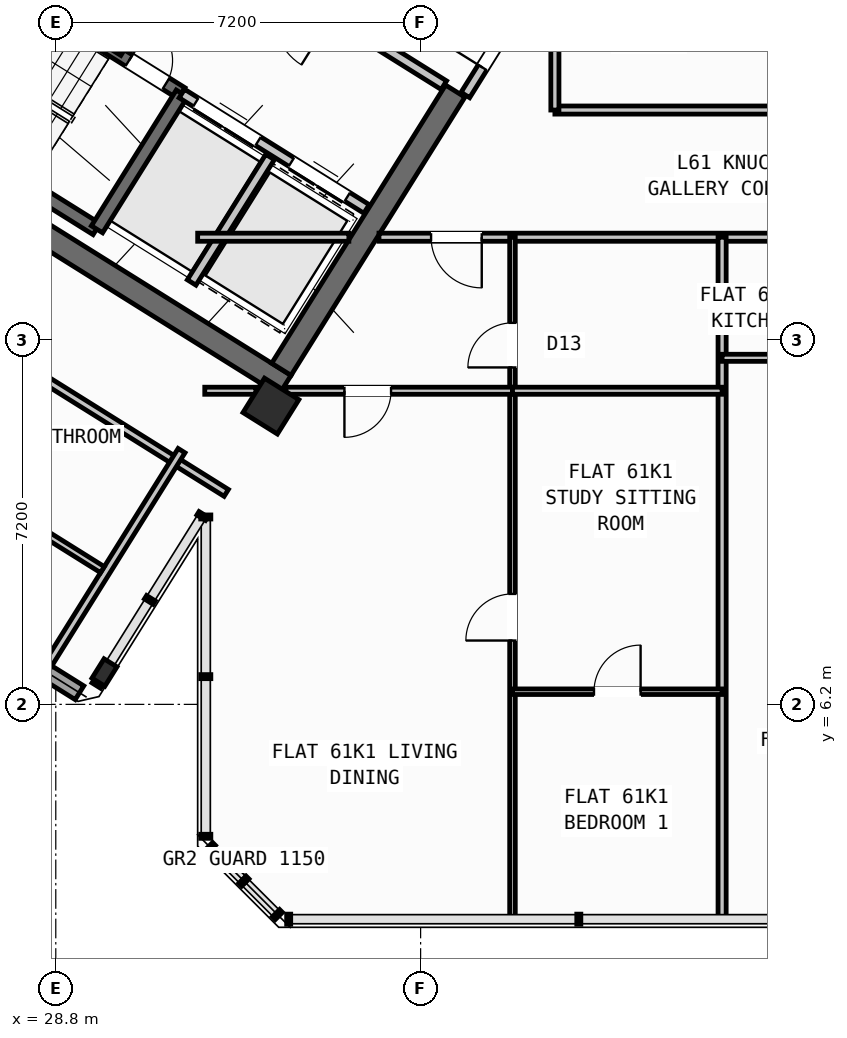
"""IFC4 building model, lengths in metres.
Left out: names, types, materials, properties, quantities, classifications, styles, units other than length and angle.
Written with IfcOpenShell. Run it as: python <this file> out.ifc"""

import sys

from ifc_helpers import new_model, si_unit, direction, frame, frame_2d, origin, origin_2d, place, context, subcontext, project, spatial, rectangle, hollow_rectangle, i_section, extrude, source, transform, mapped, element, fill, save


model = new_model("IFC4")
c1 = context("Model", 3, precision=1e-05, world=origin(), true_north=direction((0.0, 1.0)))
c2 = subcontext(c1, "Body", "Model", "MODEL_VIEW")
j1 = project(units=[si_unit("LENGTHUNIT", "METRE"), si_unit("PLANEANGLEUNIT", "RADIAN")], contexts=[c1])
p1 = place(None, origin())
s1 = spatial("IfcSite", under=j1, at=p1, CompositionType="ELEMENT")
p2 = place(p1, origin())
s2 = spatial("IfcBuilding", under=s1, at=p2, CompositionType="ELEMENT")
p3 = place(p2, frame((0.0, 0.0, 242.1)))
s3 = spatial("IfcBuildingStorey", under=s2, at=p3, CompositionType="ELEMENT", Elevation=242.1)
p4 = place(p3, frame((33.324, 12.503, 0.0), z_axis=(0.0, 0.0, 1.0), x_axis=(-0.848043529849, 0.529926571782, 0.0)))
e1 = element("IfcWall", 1, at=p4, inside=s3, PredefinedType="SHEAR", context=c2, shape_type="SweptSolid", body=[
    extrude(rectangle(XDim=13.04, YDim=0.45, at=frame_2d((6.52, 0.0))), origin(), (0.0, 0.0, 1.0), 3.32),
])
p5 = place(p3, frame((36.683, 18.304, 0.0), z_axis=(0.0, 0.0, 1.0), x_axis=(-0.529904039071, -0.848057609704, 0.0)))
e2 = element("IfcWall", 2, at=p5, inside=s3, PredefinedType="SHEAR", context=c2, shape_type="SweptSolid", body=[
    extrude(rectangle(XDim=6.475, YDim=0.45, at=frame_2d((3.238, 0.0))), origin(), (0.0, 0.0, 1.0), 3.32),
])
m1 = source(origin(), c2, "Body", "SweptSolid", [
    extrude(hollow_rectangle(XDim=0.8, YDim=0.8, WallThickness=0.032, at=origin_2d()), origin(), (0.0, 0.0, 1.0), 3.6),
])
p6 = place(p3, frame((33.046, 12.087, 0.0), z_axis=(0.0, 0.0, 1.0), x_axis=(-0.848048096156, 0.529919264233, 0.0)))
e3 = element("IfcColumn", 3, at=p6, inside=s3, PredefinedType="COLUMN", context=c2, shape_type="MappedRepresentation", body=[
    mapped(m1, transform((0.0, 0.0, 0.0), scale=1.0)),
])
m2 = source(origin(), c2, "Body", "SweptSolid", [
    extrude(i_section(OverallWidth=0.3, OverallDepth=0.45, WebThickness=0.014, FlangeThickness=0.026, at=origin_2d()), origin(), (0.0, 0.0, 1.0), 3.6),
])
p7 = place(p3, frame((29.761, 6.829, 0.0), z_axis=(0.0, 0.0, 1.0), x_axis=(-0.848048096156, 0.529919264233, 0.0)))
e4 = element("IfcColumn", 4, at=p7, inside=s3, PredefinedType="COLUMN", context=c2, shape_type="MappedRepresentation", body=[
    mapped(m2, transform((0.0, 0.0, 0.0), scale=1.0)),
])
p8 = place(p3, frame((29.268, 6.429, 0.0), z_axis=(0.0, 0.0, 1.0), x_axis=(-0.848049971435, 0.529916263149, 0.0)))
e5 = element("IfcWall", 5, at=p8, inside=s3, PredefinedType="STANDARD", context=c2, shape_type="SweptSolid", body=[
    extrude(rectangle(XDim=31.588, YDim=0.32, at=frame_2d((15.794, 0.0))), origin(), (0.0, 0.0, 1.0), 3.32),
])
p9 = place(p8, frame((16.235, 0.0, 0.0)))
e6 = element("IfcOpeningElement", 6, at=p9, cuts=e5, PredefinedType="OPENING", context=c2, shape_type="SweptSolid", body=[
    extrude(rectangle(XDim=1.2, YDim=2.15, at=frame_2d((0.6, 1.075))), frame((0.0, 0.17, 0.0), z_axis=(0.0, -1.0, 0.0), x_axis=(1.0, 0.0, 0.0)), (0.0, 0.0, 1.0), 0.34),
])
p10 = place(p8, frame((3.859, 0.0, 0.9)))
e7 = element("IfcOpeningElement", 7, at=p10, cuts=e5, PredefinedType="OPENING", context=c2, shape_type="SweptSolid", body=[
    extrude(rectangle(XDim=1.65, YDim=1.45, at=frame_2d((0.825, 0.725))), frame((0.0, 0.17, 0.0), z_axis=(0.0, -1.0, 0.0), x_axis=(1.0, 0.0, 0.0)), (0.0, 0.0, 1.0), 0.34),
])
p11 = place(p8, frame((10.519, 0.0, 0.9)))
e8 = element("IfcOpeningElement", 8, at=p11, cuts=e5, PredefinedType="OPENING", context=c2, shape_type="SweptSolid", body=[
    extrude(rectangle(XDim=1.65, YDim=1.45, at=frame_2d((0.825, 0.725))), frame((0.0, 0.17, 0.0), z_axis=(0.0, -1.0, 0.0), x_axis=(1.0, 0.0, 0.0)), (0.0, 0.0, 1.0), 0.34),
])
p12 = place(p8, frame((19.182, 0.0, 1.0)))
e9 = element("IfcOpeningElement", 9, at=p12, cuts=e5, PredefinedType="OPENING", context=c2, shape_type="SweptSolid", body=[
    extrude(rectangle(XDim=0.9, YDim=1.25, at=frame_2d((0.45, 0.625))), frame((0.0, 0.17, 0.0), z_axis=(0.0, -1.0, 0.0), x_axis=(1.0, 0.0, 0.0)), (0.0, 0.0, 1.0), 0.34),
])
p13 = place(p8, frame((22.524, 0.0, 1.0)))
e10 = element("IfcOpeningElement", 10, at=p13, cuts=e5, PredefinedType="OPENING", context=c2, shape_type="SweptSolid", body=[
    extrude(rectangle(XDim=0.9, YDim=1.25, at=frame_2d((0.45, 0.625))), frame((0.0, 0.17, 0.0), z_axis=(0.0, -1.0, 0.0), x_axis=(1.0, 0.0, 0.0)), (0.0, 0.0, 1.0), 0.34),
])
p14 = place(p8, frame((25.658, 0.0, 0.9)))
e11 = element("IfcOpeningElement", 11, at=p14, cuts=e5, PredefinedType="OPENING", context=c2, shape_type="SweptSolid", body=[
    extrude(rectangle(XDim=1.65, YDim=1.45, at=frame_2d((0.825, 0.725))), frame((0.0, 0.17, 0.0), z_axis=(0.0, -1.0, 0.0), x_axis=(1.0, 0.0, 0.0)), (0.0, 0.0, 1.0), 0.34),
])
p15 = place(p8, frame((29.278, 0.0, 0.9)))
e12 = element("IfcOpeningElement", 12, at=p15, cuts=e5, PredefinedType="OPENING", context=c2, shape_type="SweptSolid", body=[
    extrude(rectangle(XDim=1.35, YDim=1.45, at=frame_2d((0.675, 0.725))), frame((0.0, 0.17, 0.0), z_axis=(0.0, -1.0, 0.0), x_axis=(1.0, 0.0, 0.0)), (0.0, 0.0, 1.0), 0.34),
])
p16 = place(p3, frame((29.605, 15.581, 0.0), z_axis=(0.0, 0.0, 1.0), x_axis=(-0.848036911448, 0.529937163087, 0.0)))
e13 = element("IfcWall", 13, at=p16, inside=s3, PredefinedType="SHEAR", context=c2, shape_type="SweptSolid", body=[
    extrude(rectangle(XDim=7.46, YDim=0.26, at=frame_2d((3.73, 0.0))), origin(), (0.0, 0.0, 1.0), 3.32),
])
p17 = place(p3, frame((31.28, 18.261, 0.0), z_axis=(0.0, 0.0, 1.0), x_axis=(-0.848051618787, 0.529913626805, 0.0)))
e14 = element("IfcWall", 14, at=p17, inside=s3, PredefinedType="SHEAR", context=c2, shape_type="SweptSolid", body=[
    extrude(rectangle(XDim=7.46, YDim=0.26, at=frame_2d((3.73, 0.0))), origin(), (0.0, 0.0, 1.0), 3.32),
])
p18 = place(p17, frame((0.36, 0.0, 0.0)))
e15 = element("IfcOpeningElement", 15, at=p18, cuts=e14, PredefinedType="OPENING", context=c2, shape_type="SweptSolid", body=[
    extrude(rectangle(XDim=0.86, YDim=2.05, at=frame_2d((0.43, 1.025))), frame((0.0, 0.14, 0.0), z_axis=(0.0, -1.0, 0.0), x_axis=(1.0, 0.0, 0.0)), (0.0, 0.0, 1.0), 0.28),
])
p19 = place(p3, frame((31.288, 18.256, 0.0), z_axis=(0.0, 0.0, 1.0), x_axis=(-0.529943379326, -0.848033026897, 0.0)))
e16 = element("IfcWall", 16, at=p19, inside=s3, PredefinedType="SHEAR", context=c2, shape_type="SweptSolid", body=[
    extrude(rectangle(XDim=3.16, YDim=0.26, at=frame_2d((1.58, 0.0))), origin(), (0.0, 0.0, 1.0), 3.32),
])
p20 = place(p3, frame((34.933, 15.978, 0.0), z_axis=(0.0, 0.0, 1.0), x_axis=(-0.848055739377, 0.529907032327, 0.0)))
e17 = element("IfcWall", 17, at=p20, inside=s3, PredefinedType="STANDARD", context=c2, shape_type="SweptSolid", body=[
    extrude(rectangle(XDim=4.298, YDim=0.2, at=frame_2d((2.149, 0.0))), origin(), (0.0, 0.0, 1.0), 3.31),
])
p21 = place(p20, frame((0.448, 0.0, 0.0)))
e18 = element("IfcOpeningElement", 18, at=p21, cuts=e17, PredefinedType="OPENING", context=c2, shape_type="SweptSolid", body=[
    extrude(rectangle(XDim=1.3, YDim=2.2, at=frame_2d((0.65, 1.1))), frame((0.0, 0.11, 0.0), z_axis=(0.0, -1.0, 0.0), x_axis=(1.0, 0.0, 0.0)), (0.0, 0.0, 1.0), 0.22),
])
p22 = place(p20, frame((2.523, 0.0, 0.0)))
e19 = element("IfcOpeningElement", 19, at=p22, cuts=e17, PredefinedType="OPENING", context=c2, shape_type="SweptSolid", body=[
    extrude(rectangle(XDim=1.45, YDim=2.25, at=frame_2d((0.725, 1.125))), frame((0.0, 0.11, 0.0), z_axis=(0.0, -1.0, 0.0), x_axis=(1.0, 0.0, 0.0)), (0.0, 0.0, 1.0), 0.22),
])
p23 = place(p3, frame((36.459, 18.421, 0.0), z_axis=(0.0, 0.0, 1.0), x_axis=(-0.848059591691, 0.529900867089, 0.0)))
e20 = element("IfcWall", 20, at=p23, inside=s3, PredefinedType="STANDARD", context=c2, shape_type="SweptSolid", body=[
    extrude(rectangle(XDim=5.818, YDim=0.2, at=frame_2d((2.909, 0.0))), origin(), (0.0, 0.0, 1.0), 3.31),
])
p24 = place(p23, frame((2.598, 0.0, 0.0)))
e21 = element("IfcOpeningElement", 21, at=p24, cuts=e20, PredefinedType="OPENING", context=c2, shape_type="SweptSolid", body=[
    extrude(rectangle(XDim=1.15, YDim=2.1, at=frame_2d((0.575, 1.05))), frame((0.0, 0.11, 0.0), z_axis=(0.0, -1.0, 0.0), x_axis=(1.0, 0.0, 0.0)), (0.0, 0.0, 1.0), 0.22),
])
p25 = place(p3, frame((33.029, 17.003, 0.0), z_axis=(0.0, 0.0, 1.0), x_axis=(-0.529916267533, -0.848049968695, 0.0)))
e22 = element("IfcWall", 22, at=p25, inside=s3, PredefinedType="STANDARD", context=c2, shape_type="SweptSolid", body=[
    extrude(rectangle(XDim=2.92, YDim=0.2, at=frame_2d((1.46, 0.0))), origin(), (0.0, 0.0, 1.0), 3.31),
])
p26 = place(p3, frame((31.525, 21.504, 0.0), z_axis=(0.0, 0.0, 1.0), x_axis=(-0.529907497854, -0.848055448493, 0.0)))
e23 = element("IfcWall", 23, at=p26, inside=s3, PredefinedType="STANDARD", context=c2, shape_type="SweptSolid", body=[
    extrude(rectangle(XDim=2.88, YDim=0.2, at=frame_2d((1.44, 0.0))), origin(), (0.0, 0.0, 1.0), 3.31),
])
p27 = place(p3, frame((32.164, 10.374, 0.0), z_axis=(0.0, 0.0, 1.0), x_axis=(-0.848044107957, 0.529925646633, 0.0)))
e24 = element("IfcWall", 24, at=p27, inside=s3, PredefinedType="PARTITIONING", context=c2, shape_type="SweptSolid", body=[
    extrude(rectangle(XDim=15.57, YDim=0.16, at=frame_2d((7.785, 0.0))), origin(), (0.0, 0.0, 1.0), 3.31),
])
p28 = place(p27, frame((10.83, 0.0, 0.0)))
e25 = element("IfcOpeningElement", 25, at=p28, cuts=e24, PredefinedType="OPENING", context=c2, shape_type="SweptSolid", body=[
    extrude(rectangle(XDim=1.0, YDim=2.1, at=frame_2d((0.5, 1.05))), frame((0.0, 0.09, 0.0), z_axis=(0.0, -1.0, 0.0), x_axis=(1.0, 0.0, 0.0)), (0.0, 0.0, 1.0), 0.18),
])
p29 = place(p3, frame((31.282, 11.208, 0.0), z_axis=(0.0, 0.0, 1.0), x_axis=(-0.529938869374, -0.84803584519, 0.0)))
e26 = element("IfcWall", 26, at=p29, inside=s3, PredefinedType="PARTITIONING", context=c2, shape_type="SweptSolid", body=[
    extrude(rectangle(XDim=5.48, YDim=0.16, at=frame_2d((2.74, 0.0))), origin(), (0.0, 0.0, 1.0), 3.31),
])
p30 = place(p3, frame((29.72, 8.859, 0.0), z_axis=(0.0, 0.0, 1.0), x_axis=(-0.848049134363, 0.529917602752, 0.0)))
e27 = element("IfcWall", 27, at=p30, inside=s3, PredefinedType="PLUMBINGWALL", context=c2, shape_type="SweptSolid", body=[
    extrude(rectangle(XDim=14.3, YDim=0.14, at=frame_2d((7.15, 0.0))), origin(), (0.0, 0.0, 1.0), 3.31),
])
p31 = place(p30, frame((9.57, 0.0, 0.0)))
e28 = element("IfcOpeningElement", 28, at=p31, cuts=e27, PredefinedType="OPENING", context=c2, shape_type="SweptSolid", body=[
    extrude(rectangle(XDim=0.92, YDim=2.08, at=frame_2d((0.46, 1.04))), frame((0.0, 0.08, 0.0), z_axis=(0.0, -1.0, 0.0), x_axis=(1.0, 0.0, 0.0)), (0.0, 0.0, 1.0), 0.16),
])
p32 = place(p3, frame((38.451, 20.737, 0.0), z_axis=(0.0, 0.0, 1.0), x_axis=(-0.529924799939, -0.848044637038, 0.0)))
e29 = element("IfcWall", 29, at=p32, inside=s3, PredefinedType="STANDARD", context=c2, shape_type="SweptSolid", body=[
    extrude(rectangle(XDim=2.96, YDim=0.2, at=frame_2d((1.48, 0.0))), origin(), (0.0, 0.0, 1.0), 3.31),
])
p33 = place(p32, frame((1.46, 0.0, 0.0)))
e30 = element("IfcOpeningElement", 30, at=p33, cuts=e29, PredefinedType="OPENING", context=c2, shape_type="SweptSolid", body=[
    extrude(rectangle(XDim=0.86, YDim=2.05, at=frame_2d((0.43, 1.025))), frame((0.0, 0.11, 0.0), z_axis=(0.0, -1.0, 0.0), x_axis=(1.0, 0.0, 0.0)), (0.0, 0.0, 1.0), 0.22),
])
p34 = place(p3, frame((31.6, 15.42, 0.0), z_axis=(0.0, 0.0, 1.0), x_axis=(1.0, 0.0, 0.0)))
e31 = element("IfcWall", 31, at=p34, inside=s3, PredefinedType="PARTITIONING", context=c2, shape_type="SweptSolid", body=[
    extrude(rectangle(XDim=2.984, YDim=0.16, at=frame_2d((1.492, 0.0))), origin(), (0.0, 0.0, 1.0), 3.31),
])
p35 = place(p3, frame((35.178, 15.42, 0.0), z_axis=(0.0, 0.0, 1.0), x_axis=(1.0, 0.0, 0.0)))
e32 = element("IfcWall", 32, at=p35, inside=s3, PredefinedType="PARTITIONING", context=c2, shape_type="SweptSolid", body=[
    extrude(rectangle(XDim=15.552, YDim=0.16, at=frame_2d((7.776, 0.0))), origin(), (0.0, 0.0, 1.0), 3.31),
])
p36 = place(p35, frame((1.028, 0.0, 0.0)))
e33 = element("IfcOpeningElement", 33, at=p36, cuts=e32, PredefinedType="OPENING", context=c2, shape_type="SweptSolid", body=[
    extrude(rectangle(XDim=1.0, YDim=2.1, at=frame_2d((0.5, 1.05))), frame((0.0, 0.09, 0.0), z_axis=(0.0, -1.0, 0.0), x_axis=(1.0, 0.0, 0.0)), (0.0, 0.0, 1.0), 0.18),
])
p37 = place(p35, frame((8.858, 0.0, 0.0)))
e34 = element("IfcOpeningElement", 34, at=p37, cuts=e32, PredefinedType="OPENING", context=c2, shape_type="SweptSolid", body=[
    extrude(rectangle(XDim=1.0, YDim=2.1, at=frame_2d((0.5, 1.05))), frame((0.0, 0.09, 0.0), z_axis=(0.0, -1.0, 0.0), x_axis=(1.0, 0.0, 0.0)), (0.0, 0.0, 1.0), 0.18),
])
p38 = place(p3, frame((38.65, 17.93, 0.0), z_axis=(0.0, 0.0, 1.0), x_axis=(1.0, 0.0, 0.0)))
e35 = element("IfcWall", 35, at=p38, inside=s3, PredefinedType="PARTITIONING", context=c2, shape_type="SweptSolid", body=[
    extrude(rectangle(XDim=9.95, YDim=0.16, at=frame_2d((4.975, 0.0))), origin(), (0.0, 0.0, 1.0), 3.31),
])
p39 = place(p38, frame((4.475, 0.0, 0.0)))
e36 = element("IfcOpeningElement", 36, at=p39, cuts=e35, PredefinedType="OPENING", context=c2, shape_type="SweptSolid", body=[
    extrude(rectangle(XDim=1.0, YDim=2.1, at=frame_2d((0.5, 1.05))), frame((0.0, 0.09, 0.0), z_axis=(0.0, -1.0, 0.0), x_axis=(1.0, 0.0, 0.0)), (0.0, 0.0, 1.0), 0.18),
])
p40 = place(p3, frame((38.65, 17.93, 0.0), z_axis=(0.0, 0.0, 1.0), x_axis=(0.0, 1.0, 0.0)))
e37 = element("IfcWall", 37, at=p40, inside=s3, PredefinedType="PARTITIONING", context=c2, shape_type="SweptSolid", body=[
    extrude(rectangle(XDim=3.046, YDim=0.16, at=frame_2d((1.523, 0.0))), origin(), (0.0, 0.0, 1.0), 3.31),
])
p41 = place(p3, frame((41.95, 1.96, 0.0), z_axis=(0.0, 0.0, 1.0), x_axis=(0.0, 1.0, 0.0)))
e38 = element("IfcWall", 38, at=p41, inside=s3, PredefinedType="PARTITIONING", context=c2, shape_type="SweptSolid", body=[
    extrude(rectangle(XDim=13.46, YDim=0.16, at=frame_2d((6.73, 0.0))), origin(), (0.0, 0.0, 1.0), 3.31),
])
p42 = place(p3, frame((37.813, 1.96, 0.0), z_axis=(0.0, 0.0, 1.0), x_axis=(0.0, 1.0, 0.0)))
e39 = element("IfcWall", 39, at=p42, inside=s3, PredefinedType="PARTITIONING", context=c2, shape_type="SweptSolid", body=[
    extrude(rectangle(XDim=13.46, YDim=0.11, at=frame_2d((6.73, 0.0))), origin(), (0.0, 0.0, 1.0), 3.31),
])
p43 = place(p42, frame((5.5, 0.0, 0.0)))
e40 = element("IfcOpeningElement", 40, at=p43, cuts=e39, PredefinedType="OPENING", context=c2, shape_type="SweptSolid", body=[
    extrude(rectangle(XDim=0.92, YDim=2.08, at=frame_2d((0.46, 1.04))), frame((0.0, 0.065, 0.0), z_axis=(0.0, -1.0, 0.0), x_axis=(1.0, 0.0, 0.0)), (0.0, 0.0, 1.0), 0.13),
])
p44 = place(p42, frame((10.89, 0.0, 0.0)))
e41 = element("IfcOpeningElement", 41, at=p44, cuts=e39, PredefinedType="OPENING", context=c2, shape_type="SweptSolid", body=[
    extrude(rectangle(XDim=0.88, YDim=2.08, at=frame_2d((0.44, 1.04))), frame((0.0, 0.065, 0.0), z_axis=(0.0, -1.0, 0.0), x_axis=(1.0, 0.0, 0.0)), (0.0, 0.0, 1.0), 0.13),
])
p45 = place(p3, frame((31.74, 12.39, 0.0), z_axis=(0.0, 0.0, 1.0), x_axis=(1.0, 0.0, 0.0)))
e42 = element("IfcWall", 42, at=p45, inside=s3, PredefinedType="PLUMBINGWALL", context=c2, shape_type="SweptSolid", body=[
    extrude(rectangle(XDim=1.01, YDim=0.14, at=frame_2d((0.505, 0.0))), origin(), (0.0, 0.0, 1.0), 3.31),
])
p46 = place(p3, frame((33.339, 12.39, 0.0), z_axis=(0.0, 0.0, 1.0), x_axis=(1.0, 0.0, 0.0)))
e43 = element("IfcWall", 43, at=p46, inside=s3, PredefinedType="PLUMBINGWALL", context=c2, shape_type="SweptSolid", body=[
    extrude(rectangle(XDim=4.474, YDim=0.14, at=frame_2d((2.237, 0.0))), origin(), (0.0, 0.0, 1.0), 2.495),
])
p47 = place(p46, frame((1.158, 0.0, 0.0)))
e44 = element("IfcOpeningElement", 44, at=p47, cuts=e43, PredefinedType="OPENING", context=c2, shape_type="SweptSolid", body=[
    extrude(rectangle(XDim=0.92, YDim=2.08, at=frame_2d((0.46, 1.04))), frame((0.0, 0.08, 0.0), z_axis=(0.0, -1.0, 0.0), x_axis=(1.0, 0.0, 0.0)), (0.0, 0.0, 1.0), 0.16),
])
p48 = place(p3, frame((37.813, 12.39, 0.0), z_axis=(0.0, 0.0, 1.0), x_axis=(1.0, 0.0, 0.0)))
e45 = element("IfcWall", 45, at=p48, inside=s3, PredefinedType="PLUMBINGWALL", context=c2, shape_type="SweptSolid", body=[
    extrude(rectangle(XDim=4.137, YDim=0.14, at=frame_2d((2.068, 0.0))), origin(), (0.0, 0.0, 1.0), 2.495),
])
p49 = place(p3, frame((37.813, 6.45, 0.0), z_axis=(0.0, 0.0, 1.0), x_axis=(1.0, 0.0, 0.0)))
e46 = element("IfcWall", 46, at=p49, inside=s3, PredefinedType="PARTITIONING", context=c2, shape_type="SweptSolid", body=[
    extrude(rectangle(XDim=4.137, YDim=0.11, at=frame_2d((2.068, 0.0))), origin(), (0.0, 0.0, 1.0), 3.31),
])
p50 = place(p49, frame((1.608, 0.0, 0.0)))
e47 = element("IfcOpeningElement", 47, at=p50, cuts=e46, PredefinedType="OPENING", context=c2, shape_type="SweptSolid", body=[
    extrude(rectangle(XDim=0.92, YDim=2.08, at=frame_2d((0.46, 1.04))), frame((0.0, 0.065, 0.0), z_axis=(0.0, -1.0, 0.0), x_axis=(1.0, 0.0, 0.0)), (0.0, 0.0, 1.0), 0.13),
])
p51 = place(p3, frame((41.95, 13.04, 0.0), z_axis=(0.0, 0.0, 1.0), x_axis=(1.0, 0.0, 0.0)))
e48 = element("IfcWall", 48, at=p51, inside=s3, PredefinedType="PLUMBINGWALL", context=c2, shape_type="SweptSolid", body=[
    extrude(rectangle(XDim=5.122, YDim=0.14, at=frame_2d((2.561, 0.0))), origin(), (0.0, 0.0, 1.0), 3.31),
])
p52 = place(p51, frame((2.101, 0.0, 0.0)))
e49 = element("IfcOpeningElement", 49, at=p52, cuts=e48, PredefinedType="OPENING", context=c2, shape_type="SweptSolid", body=[
    extrude(rectangle(XDim=0.92, YDim=2.08, at=frame_2d((0.46, 1.04))), frame((0.0, 0.08, 0.0), z_axis=(0.0, -1.0, 0.0), x_axis=(1.0, 0.0, 0.0)), (0.0, 0.0, 1.0), 0.16),
])
m3 = source(origin(), c2, "Body", "SweptSolid", [
    extrude(rectangle(XDim=0.86, YDim=2.05, at=frame_2d((0.43, 1.025))), frame((0.0, 0.025, 0.0), z_axis=(0.0, -1.0, 0.0), x_axis=(1.0, 0.0, 0.0)), (0.0, 0.0, 1.0), 0.05),
])
p53 = place(p18, frame((0.86, 0.0, 0.0), z_axis=(0.0, 0.0, 1.0), x_axis=(-1.0, 0.0, 0.0)))
e50 = element("IfcDoor", 50, at=p53, inside=s3, OperationType="SINGLE_SWING_LEFT", PredefinedType="DOOR", context=c2, shape_type="MappedRepresentation", body=[
    mapped(m3, transform((0.0, 0.0, 0.0), scale=1.0)),
])
fill(e15, e50)
m4 = source(origin(), c2, "Body", "SweptSolid", [
    extrude(rectangle(XDim=1.3, YDim=2.2, at=frame_2d((0.65, 1.1))), frame((0.0, 0.025, 0.0), z_axis=(0.0, -1.0, 0.0), x_axis=(1.0, 0.0, 0.0)), (0.0, 0.0, 1.0), 0.05),
])
p54 = place(p21, origin())
e51 = element("IfcDoor", 51, at=p54, inside=s3, OperationType="DOUBLE_DOOR_SLIDING", PredefinedType="DOOR", context=c2, shape_type="MappedRepresentation", body=[
    mapped(m4, transform((0.0, 0.0, 0.0), scale=1.0)),
])
fill(e18, e51)
m5 = source(origin(), c2, "Body", "SweptSolid", [
    extrude(rectangle(XDim=1.45, YDim=2.25, at=frame_2d((0.725, 1.125))), frame((0.0, 0.025, 0.0), z_axis=(0.0, -1.0, 0.0), x_axis=(1.0, 0.0, 0.0)), (0.0, 0.0, 1.0), 0.05),
])
p55 = place(p22, origin())
e52 = element("IfcDoor", 52, at=p55, inside=s3, OperationType="DOUBLE_DOOR_SLIDING", PredefinedType="DOOR", context=c2, shape_type="MappedRepresentation", body=[
    mapped(m5, transform((0.0, 0.0, 0.0), scale=1.0)),
])
fill(e19, e52)
p56 = place(p33, frame((0.86, 0.0, 0.0), z_axis=(0.0, 0.0, 1.0), x_axis=(-1.0, 0.0, 0.0)))
e53 = element("IfcDoor", 53, at=p56, inside=s3, OperationType="SINGLE_SWING_LEFT", PredefinedType="DOOR", context=c2, shape_type="MappedRepresentation", body=[
    mapped(m3, transform((0.0, 0.0, 0.0), scale=1.0)),
])
fill(e30, e53)
m6 = source(origin(), c2, "Body", "SweptSolid", [
    extrude(rectangle(XDim=0.92, YDim=2.08, at=frame_2d((0.46, 1.04))), frame((0.0, 0.025, 0.0), z_axis=(0.0, -1.0, 0.0), x_axis=(1.0, 0.0, 0.0)), (0.0, 0.0, 1.0), 0.05),
])
p57 = place(p43, origin())
e54 = element("IfcDoor", 54, at=p57, inside=s3, OperationType="SINGLE_SWING_LEFT", PredefinedType="DOOR", context=c2, shape_type="MappedRepresentation", body=[
    mapped(m6, transform((0.0, 0.0, 0.0), scale=1.0)),
])
fill(e40, e54)
p58 = place(p50, origin())
e55 = element("IfcDoor", 55, at=p58, inside=s3, OperationType="SINGLE_SWING_RIGHT", PredefinedType="DOOR", context=c2, shape_type="MappedRepresentation", body=[
    mapped(m6, transform((0.0, 0.0, 0.0), scale=1.0)),
])
fill(e47, e55)
m7 = source(origin(), c2, "Body", "SweptSolid", [
    extrude(rectangle(XDim=1.0, YDim=2.1, at=frame_2d((0.5, 1.05))), frame((0.0, 0.025, 0.0), z_axis=(0.0, -1.0, 0.0), x_axis=(1.0, 0.0, 0.0)), (0.0, 0.0, 1.0), 0.05),
])
p59 = place(p36, frame((1.0, 0.0, 0.0), z_axis=(0.0, 0.0, 1.0), x_axis=(-1.0, 0.0, 0.0)))
e56 = element("IfcDoor", 56, at=p59, inside=s3, OperationType="SINGLE_SWING_LEFT", PredefinedType="DOOR", context=c2, shape_type="MappedRepresentation", body=[
    mapped(m7, transform((0.0, 0.0, 0.0), scale=1.0)),
])
fill(e33, e56)
p60 = place(p47, frame((0.92, 0.0, 0.0), z_axis=(0.0, 0.0, 1.0), x_axis=(-1.0, 0.0, 0.0)))
e57 = element("IfcDoor", 57, at=p60, inside=s3, OperationType="SINGLE_SWING_RIGHT", PredefinedType="DOOR", context=c2, shape_type="MappedRepresentation", body=[
    mapped(m6, transform((0.0, 0.0, 0.0), scale=1.0)),
])
fill(e44, e57)
m8 = source(origin(), c2, "Body", "SweptSolid", [
    extrude(rectangle(XDim=0.88, YDim=2.08, at=frame_2d((0.44, 1.04))), frame((0.0, 0.025, 0.0), z_axis=(0.0, -1.0, 0.0), x_axis=(1.0, 0.0, 0.0)), (0.0, 0.0, 1.0), 0.05),
])
p61 = place(p44, origin())
e58 = element("IfcDoor", 58, at=p61, inside=s3, OperationType="SINGLE_SWING_LEFT", PredefinedType="DOOR", context=c2, shape_type="MappedRepresentation", body=[
    mapped(m8, transform((0.0, 0.0, 0.0), scale=1.0)),
])
fill(e41, e58)
save(model, sys.argv[1])
